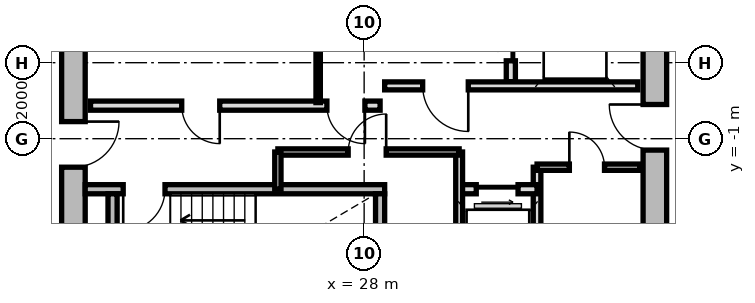
"""IFC4 building model, lengths in metres.
Left out: names, types, materials, properties, quantities, classifications, styles, units other than length and angle.
Written with IfcOpenShell. Run it as: python <this file> out.ifc"""

import sys

from ifc_helpers import new_model, si_unit, direction, frame, frame_2d, origin, place, context, subcontext, project, spatial, rectangle, extrude, source, transform, mapped, element, fill, save


model = new_model("IFC4")
c1 = context("Model", 3, precision=1e-05, world=origin(), true_north=direction((0.0, 1.0)))
c2 = subcontext(c1, "Body", "Model", "MODEL_VIEW")
j1 = project(units=[si_unit("LENGTHUNIT", "METRE"), si_unit("PLANEANGLEUNIT", "RADIAN")], contexts=[c1])
p1 = place(None, origin())
s1 = spatial("IfcSite", under=j1, at=p1, CompositionType="ELEMENT")
p2 = place(p1, origin())
s2 = spatial("IfcBuilding", under=s1, at=p2, CompositionType="ELEMENT")
p3 = place(p2, frame((0.0, 0.0, 177.0)))
s3 = spatial("IfcBuildingStorey", under=s2, at=p3, CompositionType="ELEMENT", Elevation=177.0)
m1 = source(origin(), c2, "Body", "SweptSolid", [
    extrude(rectangle(XDim=11.1, YDim=0.62, at=frame_2d((5.55, 0.0))), origin(), (0.0, 0.0, 1.0), 2.81),
])
p4 = place(p3, frame((20.35, -5.55, 0.0), z_axis=(0.0, 0.0, 1.0), x_axis=(0.0, 1.0, 0.0)))
e1 = element("IfcWall", 1, at=p4, inside=s3, PredefinedType="SHEAR", context=c2, shape_type="MappedRepresentation", body=[
    mapped(m1, transform((0.0, 0.0, 0.0), x_axis=(1.0, 0.0, 0.0), y_axis=(0.0, 1.0, 0.0), z_axis=(0.0, 0.0, 1.0), scale=1.0)),
])
p5 = place(p4, frame((3.8, 0.0, 0.0)))
e2 = element("IfcOpeningElement", 2, at=p5, cuts=e1, PredefinedType="OPENING", context=c2, shape_type="SweptSolid", body=[
    extrude(rectangle(XDim=1.2, YDim=2.15, at=frame_2d((0.6, 1.075))), frame((0.0, 0.32, 0.0), z_axis=(0.0, -1.0, 0.0), x_axis=(1.0, 0.0, 0.0)), (0.0, 0.0, 1.0), 0.64),
])
p6 = place(p3, frame((35.65, 5.55, 0.0), z_axis=(0.0, 0.0, 1.0), x_axis=(0.0, -1.0, 0.0)))
e3 = element("IfcWall", 3, at=p6, inside=s3, PredefinedType="SHEAR", context=c2, shape_type="MappedRepresentation", body=[
    mapped(m1, transform((0.0, 0.0, 0.0), x_axis=(1.0, 0.0, 0.0), y_axis=(0.0, 1.0, 0.0), z_axis=(0.0, 0.0, 1.0), scale=1.0)),
])
p7 = place(p6, frame((5.65, 0.0, 0.0)))
e4 = element("IfcOpeningElement", 4, at=p7, cuts=e3, PredefinedType="OPENING", context=c2, shape_type="SweptSolid", body=[
    extrude(rectangle(XDim=1.2, YDim=2.15, at=frame_2d((0.6, 1.075))), frame((0.0, 0.32, 0.0), z_axis=(0.0, -1.0, 0.0), x_axis=(1.0, 0.0, 0.0)), (0.0, 0.0, 1.0), 0.64),
])
m2 = source(origin(), c2, "Body", "SweptSolid", [
    extrude(rectangle(XDim=7.88, YDim=0.24, at=frame_2d((3.94, 0.0))), origin(), (0.0, 0.0, 1.0), 2.81),
])
p8 = place(p3, frame((20.66, -2.33, 0.0), z_axis=(0.0, 0.0, 1.0), x_axis=(1.0, 0.0, 0.0)))
e5 = element("IfcWall", 5, at=p8, inside=s3, PredefinedType="PARTITIONING", context=c2, shape_type="MappedRepresentation", body=[
    mapped(m2, transform((0.0, 0.0, 0.0), x_axis=(1.0, 0.0, 0.0), y_axis=(0.0, 1.0, 0.0), z_axis=(0.0, 0.0, 1.0), scale=1.0)),
])
p9 = place(p8, frame((1.0, 0.0, 0.0)))
e6 = element("IfcOpeningElement", 6, at=p9, cuts=e5, PredefinedType="OPENING", context=c2, shape_type="SweptSolid", body=[
    extrude(rectangle(XDim=1.1, YDim=2.15, at=frame_2d((0.55, 1.075))), frame((0.0, 0.13, 0.0), z_axis=(0.0, -1.0, 0.0), x_axis=(1.0, 0.0, 0.0)), (0.0, 0.0, 1.0), 0.26),
])
m3 = source(origin(), c2, "Body", "SweptSolid", [
    extrude(rectangle(XDim=3.19, YDim=0.24, at=frame_2d((1.595, 0.0))), origin(), (0.0, 0.0, 1.0), 2.81),
])
for number, where, z_axis, x_axis in (
    (7, (21.38, -5.64, 0.0), (0.0, 0.0, 1.0), (0.0, 1.0, 0.0)),
    (8, (28.42, -5.64, 0.0), (0.0, 0.0, 1.0), (0.0, 1.0, 0.0)),
):
    element("IfcWall", number, at=place(p3, frame(where, z_axis=z_axis, x_axis=x_axis)), inside=s3, PredefinedType="PARTITIONING", context=c2, shape_type="MappedRepresentation", body=[
        mapped(m3, transform((0.0, 0.0, 0.0), x_axis=(1.0, 0.0, 0.0), y_axis=(0.0, 1.0, 0.0), z_axis=(0.0, 0.0, 1.0), scale=1.0)),
    ])
m4 = source(origin(), c2, "Body", "SweptSolid", [
    extrude(rectangle(XDim=5.0, YDim=0.24, at=frame_2d((2.5, 0.0))), origin(), (0.0, 0.0, 1.0), 2.795),
])
p10 = place(p3, frame((31.86, 0.5, 0.0), z_axis=(0.0, 0.0, 1.0), x_axis=(0.0, 1.0, 0.0)))
e9 = element("IfcWall", 9, at=p10, inside=s3, PredefinedType="PARTITIONING", context=c2, shape_type="MappedRepresentation", body=[
    mapped(m4, transform((0.0, 0.0, 0.0), x_axis=(1.0, 0.0, 0.0), y_axis=(0.0, 1.0, 0.0), z_axis=(0.0, 0.0, 1.0), scale=1.0)),
])
p11 = place(p10, frame((3.05, 0.0, 0.0)))
e10 = element("IfcOpeningElement", 10, at=p11, cuts=e9, PredefinedType="OPENING", context=c2, shape_type="SweptSolid", body=[
    extrude(rectangle(XDim=1.3, YDim=2.2, at=frame_2d((0.65, 1.1))), frame((0.0, 0.13, 0.0), z_axis=(0.0, -1.0, 0.0), x_axis=(1.0, 0.0, 0.0)), (0.0, 0.0, 1.0), 0.26),
])
p12 = place(p10, frame((0.55, 0.0, 0.0)))
e11 = element("IfcOpeningElement", 11, at=p12, cuts=e9, PredefinedType="OPENING", context=c2, shape_type="SweptSolid", body=[
    extrude(rectangle(XDim=1.3, YDim=2.2, at=frame_2d((0.65, 1.1))), frame((0.0, 0.13, 0.0), z_axis=(0.0, -1.0, 0.0), x_axis=(1.0, 0.0, 0.0)), (0.0, 0.0, 1.0), 0.26),
])
m5 = source(origin(), c2, "Body", "SweptSolid", [
    extrude(rectangle(XDim=6.66, YDim=0.21, at=frame_2d((3.33, 0.0))), origin(), (0.0, 0.0, 1.0), 2.795),
])
p13 = place(p3, frame((28.54, 0.39, 0.0), z_axis=(0.0, 0.0, 1.0), x_axis=(1.0, 0.0, 0.0)))
e12 = element("IfcWall", 12, at=p13, inside=s3, PredefinedType="PARTITIONING", context=c2, shape_type="MappedRepresentation", body=[
    mapped(m5, transform((0.0, 0.0, 0.0), x_axis=(1.0, 0.0, 0.0), y_axis=(0.0, 1.0, 0.0), z_axis=(0.0, 0.0, 1.0), scale=1.0)),
])
p14 = place(p13, frame((1.0, 0.0, 0.0)))
e13 = element("IfcOpeningElement", 13, at=p14, cuts=e12, PredefinedType="OPENING", context=c2, shape_type="SweptSolid", body=[
    extrude(rectangle(XDim=1.2, YDim=2.15, at=frame_2d((0.6, 1.075))), frame((0.0, 0.115, 0.0), z_axis=(0.0, -1.0, 0.0), x_axis=(1.0, 0.0, 0.0)), (0.0, 0.0, 1.0), 0.23),
])
m6 = source(origin(), c2, "Body", "SweptSolid", [
    extrude(rectangle(XDim=7.62, YDim=0.24, at=frame_2d((3.81, 0.0))), origin(), (0.0, 0.0, 1.0), 2.795),
])
p15 = place(p3, frame((20.8, -0.13, 0.0), z_axis=(0.0, 0.0, 1.0), x_axis=(1.0, 0.0, 0.0)))
e14 = element("IfcWall", 14, at=p15, inside=s3, PredefinedType="PARTITIONING", context=c2, shape_type="MappedRepresentation", body=[
    mapped(m6, transform((0.0, 0.0, 0.0), x_axis=(1.0, 0.0, 0.0), y_axis=(0.0, 1.0, 0.0), z_axis=(0.0, 0.0, 1.0), scale=1.0)),
])
p16 = place(p15, frame((6.22, 0.0, 0.0)))
e15 = element("IfcOpeningElement", 15, at=p16, cuts=e14, PredefinedType="OPENING", context=c2, shape_type="SweptSolid", body=[
    extrude(rectangle(XDim=1.0, YDim=2.1, at=frame_2d((0.5, 1.05))), frame((0.0, 0.13, 0.0), z_axis=(0.0, -1.0, 0.0), x_axis=(1.0, 0.0, 0.0)), (0.0, 0.0, 1.0), 0.26),
])
p17 = place(p15, frame((2.4, 0.0, 0.0)))
e16 = element("IfcOpeningElement", 16, at=p17, cuts=e14, PredefinedType="OPENING", context=c2, shape_type="SweptSolid", body=[
    extrude(rectangle(XDim=1.0, YDim=2.1, at=frame_2d((0.5, 1.05))), frame((0.0, 0.13, 0.0), z_axis=(0.0, -1.0, 0.0), x_axis=(1.0, 0.0, 0.0)), (0.0, 0.0, 1.0), 0.26),
])
m7 = source(origin(), c2, "Body", "SweptSolid", [
    extrude(rectangle(XDim=2.33, YDim=0.115, at=frame_2d((1.165, 0.0))), origin(), (0.0, 0.0, 1.0), 2.795),
])
p18 = place(p3, frame((26.79, -0.05, 0.0), z_axis=(0.0, 0.0, 1.0), x_axis=(0.0, 1.0, 0.0)))
e17 = element("IfcWall", 17, at=p18, inside=s3, PredefinedType="PARTITIONING", context=c2, shape_type="MappedRepresentation", body=[
    mapped(m7, transform((0.0, 0.0, 0.0), x_axis=(1.0, 0.0, 0.0), y_axis=(0.0, 1.0, 0.0), z_axis=(0.0, 0.0, 1.0), scale=1.0)),
])
m8 = source(origin(), c2, "Body", "SweptSolid", [
    extrude(rectangle(XDim=3.8, YDim=0.2, at=frame_2d((1.9, 0.0))), origin(), (0.0, 0.0, 1.0), 2.795),
])
p19 = place(p3, frame((32.55, -5.55, 0.0), z_axis=(0.0, 0.0, 1.0), x_axis=(0.0, 1.0, 0.0)))
e18 = element("IfcWall", 18, at=p19, inside=s3, PredefinedType="PARTITIONING", context=c2, shape_type="MappedRepresentation", body=[
    mapped(m8, transform((0.0, 0.0, 0.0), x_axis=(1.0, 0.0, 0.0), y_axis=(0.0, 1.0, 0.0), z_axis=(0.0, 0.0, 1.0), scale=1.0)),
])
m9 = source(origin(), c2, "Body", "SweptSolid", [
    extrude(rectangle(XDim=2.05, YDim=0.24, at=frame_2d((1.025, 0.0))), origin(), (0.0, 0.0, 1.0), 2.795),
])
p20 = place(p3, frame((30.5, -2.33, 0.0), z_axis=(0.0, 0.0, 1.0), x_axis=(1.0, 0.0, 0.0)))
e19 = element("IfcWall", 19, at=p20, inside=s3, PredefinedType="PARTITIONING", context=c2, shape_type="MappedRepresentation", body=[
    mapped(m9, transform((0.0, 0.0, 0.0), x_axis=(1.0, 0.0, 0.0), y_axis=(0.0, 1.0, 0.0), z_axis=(0.0, 0.0, 1.0), scale=1.0)),
])
p21 = place(p20, frame((0.45, 0.0, 0.0)))
e20 = element("IfcOpeningElement", 20, at=p21, cuts=e19, PredefinedType="OPENING", context=c2, shape_type="SweptSolid", body=[
    extrude(rectangle(XDim=1.1, YDim=2.2, at=frame_2d((0.55, 1.1))), frame((0.0, 0.13, 0.0), z_axis=(0.0, -1.0, 0.0), x_axis=(1.0, 0.0, 0.0)), (0.0, 0.0, 1.0), 0.26),
])
m10 = source(origin(), c2, "Body", "SweptSolid", [
    extrude(rectangle(XDim=4.2, YDim=0.18, at=frame_2d((2.1, 0.0))), origin(), (0.0, 0.0, 1.0), 2.795),
])
p22 = place(p3, frame((30.5, -5.55, 0.0), z_axis=(0.0, 0.0, 1.0), x_axis=(0.0, 1.0, 0.0)))
e21 = element("IfcWall", 21, at=p22, inside=s3, PredefinedType="PARTITIONING", context=c2, shape_type="MappedRepresentation", body=[
    mapped(m10, transform((0.0, 0.0, 0.0), x_axis=(1.0, 0.0, 0.0), y_axis=(0.0, 1.0, 0.0), z_axis=(0.0, 0.0, 1.0), scale=1.0)),
])
m11 = source(origin(), c2, "Body", "SweptSolid", [
    extrude(rectangle(XDim=4.77, YDim=0.165, at=frame_2d((2.385, 0.0))), origin(), (0.0, 0.0, 1.0), 2.795),
])
p23 = place(p3, frame((25.73, -1.35, 0.0), z_axis=(0.0, 0.0, 1.0), x_axis=(1.0, 0.0, 0.0)))
e22 = element("IfcWall", 22, at=p23, inside=s3, PredefinedType="PARTITIONING", context=c2, shape_type="MappedRepresentation", body=[
    mapped(m11, transform((0.0, 0.0, 0.0), x_axis=(1.0, 0.0, 0.0), y_axis=(0.0, 1.0, 0.0), z_axis=(0.0, 0.0, 1.0), scale=1.0)),
])
p24 = place(p23, frame((1.85, 0.0, 0.0)))
e23 = element("IfcOpeningElement", 23, at=p24, cuts=e22, PredefinedType="OPENING", context=c2, shape_type="SweptSolid", body=[
    extrude(rectangle(XDim=1.0, YDim=2.1, at=frame_2d((0.5, 1.05))), frame((0.0, 0.093, 0.0), z_axis=(0.0, -1.0, 0.0), x_axis=(1.0, 0.0, 0.0)), (0.0, 0.0, 1.0), 0.185),
])
m12 = source(origin(), c2, "Body", "SweptSolid", [
    extrude(rectangle(XDim=0.98, YDim=0.165, at=frame_2d((0.49, 0.0))), origin(), (0.0, 0.0, 1.0), 2.795),
])
p25 = place(p3, frame((25.73, -2.33, 0.0), z_axis=(0.0, 0.0, 1.0), x_axis=(0.0, 1.0, 0.0)))
e24 = element("IfcWall", 24, at=p25, inside=s3, PredefinedType="PARTITIONING", context=c2, shape_type="MappedRepresentation", body=[
    mapped(m12, transform((0.0, 0.0, 0.0), x_axis=(1.0, 0.0, 0.0), y_axis=(0.0, 1.0, 0.0), z_axis=(0.0, 0.0, 1.0), scale=1.0)),
])
m13 = source(origin(), c2, "Body", "SweptSolid", [
    extrude(rectangle(XDim=2.7, YDim=0.165, at=frame_2d((1.35, 0.0))), origin(), (0.0, 0.0, 1.0), 2.795),
])
p26 = place(p3, frame((32.55, -1.75, 0.0), z_axis=(0.0, 0.0, 1.0), x_axis=(1.0, 0.0, 0.0)))
e25 = element("IfcWall", 25, at=p26, inside=s3, PredefinedType="PARTITIONING", context=c2, shape_type="MappedRepresentation", body=[
    mapped(m13, transform((0.0, 0.0, 0.0), x_axis=(1.0, 0.0, 0.0), y_axis=(0.0, 1.0, 0.0), z_axis=(0.0, 0.0, 1.0), scale=1.0)),
])
p27 = place(p26, frame((0.85, 0.0, 0.0)))
e26 = element("IfcOpeningElement", 26, at=p27, cuts=e25, PredefinedType="OPENING", context=c2, shape_type="SweptSolid", body=[
    extrude(rectangle(XDim=0.925, YDim=2.1, at=frame_2d((0.462, 1.05))), frame((0.0, 0.093, 0.0), z_axis=(0.0, -1.0, 0.0), x_axis=(1.0, 0.0, 0.0)), (0.0, 0.0, 1.0), 0.185),
])
m14 = source(origin(), c2, "Body", "SweptSolid", [
    extrude(rectangle(XDim=1.1, YDim=2.15, at=frame_2d((0.55, 1.075))), frame((0.0, 0.025, 0.0), z_axis=(0.0, -1.0, 0.0), x_axis=(1.0, 0.0, 0.0)), (0.0, 0.0, 1.0), 0.05),
])
p28 = place(p9, frame((1.1, 0.0, 0.0), z_axis=(0.0, 0.0, 1.0), x_axis=(-1.0, 0.0, 0.0)))
e27 = element("IfcDoor", 27, at=p28, inside=s3, OperationType="SINGLE_SWING_RIGHT", PredefinedType="DOOR", context=c2, shape_type="MappedRepresentation", body=[
    mapped(m14, transform((0.0, 0.0, 0.0), x_axis=(1.0, 0.0, 0.0), y_axis=(0.0, 1.0, 0.0), z_axis=(0.0, 0.0, 1.0), scale=1.0)),
])
fill(e6, e27)
m15 = source(origin(), c2, "Body", "SweptSolid", [
    extrude(rectangle(XDim=1.3, YDim=2.2, at=frame_2d((0.65, 1.1))), frame((0.0, 0.025, 0.0), z_axis=(0.0, -1.0, 0.0), x_axis=(1.0, 0.0, 0.0)), (0.0, 0.0, 1.0), 0.05),
])
p29 = place(p12, origin())
e28 = element("IfcDoor", 28, at=p29, inside=s3, OperationType="SLIDING_TO_RIGHT", PredefinedType="DOOR", context=c2, shape_type="MappedRepresentation", body=[
    mapped(m15, transform((0.0, 0.0, 0.0), x_axis=(1.0, 0.0, 0.0), y_axis=(0.0, 1.0, 0.0), z_axis=(0.0, 0.0, 1.0), scale=1.0)),
])
fill(e11, e28)
m16 = source(origin(), c2, "Body", "SweptSolid", [
    extrude(rectangle(XDim=1.2, YDim=2.15, at=frame_2d((0.6, 1.075))), frame((0.0, 0.025, 0.0), z_axis=(0.0, -1.0, 0.0), x_axis=(1.0, 0.0, 0.0)), (0.0, 0.0, 1.0), 0.05),
])
p30 = place(p14, frame((1.2, 0.0, 0.0), z_axis=(0.0, 0.0, 1.0), x_axis=(-1.0, 0.0, 0.0)))
e29 = element("IfcDoor", 29, at=p30, inside=s3, OperationType="SINGLE_SWING_LEFT", PredefinedType="DOOR", context=c2, shape_type="MappedRepresentation", body=[
    mapped(m16, transform((0.0, 0.0, 0.0), x_axis=(1.0, 0.0, 0.0), y_axis=(0.0, 1.0, 0.0), z_axis=(0.0, 0.0, 1.0), scale=1.0)),
])
fill(e13, e29)
p31 = place(p5, frame((1.2, 0.0, 0.0), z_axis=(0.0, 0.0, 1.0), x_axis=(-1.0, 0.0, 0.0)))
e30 = element("IfcDoor", 30, at=p31, inside=s3, OperationType="SINGLE_SWING_LEFT", PredefinedType="DOOR", context=c2, shape_type="MappedRepresentation", body=[
    mapped(m16, transform((0.0, 0.0, 0.0), x_axis=(1.0, 0.0, 0.0), y_axis=(0.0, 1.0, 0.0), z_axis=(0.0, 0.0, 1.0), scale=1.0)),
])
fill(e2, e30)
p32 = place(p7, frame((1.2, 0.0, 0.0), z_axis=(0.0, 0.0, 1.0), x_axis=(-1.0, 0.0, 0.0)))
e31 = element("IfcDoor", 31, at=p32, inside=s3, OperationType="SINGLE_SWING_RIGHT", PredefinedType="DOOR", context=c2, shape_type="MappedRepresentation", body=[
    mapped(m16, transform((0.0, 0.0, 0.0), x_axis=(1.0, 0.0, 0.0), y_axis=(0.0, 1.0, 0.0), z_axis=(0.0, 0.0, 1.0), scale=1.0)),
])
fill(e4, e31)
m17 = source(origin(), c2, "Body", "SweptSolid", [
    extrude(rectangle(XDim=1.0, YDim=2.1, at=frame_2d((0.5, 1.05))), frame((0.0, 0.025, 0.0), z_axis=(0.0, -1.0, 0.0), x_axis=(1.0, 0.0, 0.0)), (0.0, 0.0, 1.0), 0.05),
])
p33 = place(p16, frame((1.0, 0.0, 0.0), z_axis=(0.0, 0.0, 1.0), x_axis=(-1.0, 0.0, 0.0)))
e32 = element("IfcDoor", 32, at=p33, inside=s3, OperationType="SINGLE_SWING_LEFT", PredefinedType="DOOR", context=c2, shape_type="MappedRepresentation", body=[
    mapped(m17, transform((0.0, 0.0, 0.0), x_axis=(1.0, 0.0, 0.0), y_axis=(0.0, 1.0, 0.0), z_axis=(0.0, 0.0, 1.0), scale=1.0)),
])
fill(e15, e32)
p34 = place(p17, frame((1.0, 0.0, 0.0), z_axis=(0.0, 0.0, 1.0), x_axis=(-1.0, 0.0, 0.0)))
e33 = element("IfcDoor", 33, at=p34, inside=s3, OperationType="SINGLE_SWING_LEFT", PredefinedType="DOOR", context=c2, shape_type="MappedRepresentation", body=[
    mapped(m17, transform((0.0, 0.0, 0.0), x_axis=(1.0, 0.0, 0.0), y_axis=(0.0, 1.0, 0.0), z_axis=(0.0, 0.0, 1.0), scale=1.0)),
])
fill(e16, e33)
m18 = source(origin(), c2, "Body", "SweptSolid", [
    extrude(rectangle(XDim=1.1, YDim=2.2, at=frame_2d((0.55, 1.1))), frame((0.0, 0.025, 0.0), z_axis=(0.0, -1.0, 0.0), x_axis=(1.0, 0.0, 0.0)), (0.0, 0.0, 1.0), 0.05),
])
p35 = place(p21, frame((1.1, 0.0, 0.0), z_axis=(0.0, 0.0, 1.0), x_axis=(-1.0, 0.0, 0.0)))
e34 = element("IfcDoor", 34, at=p35, inside=s3, OperationType="SLIDING_TO_RIGHT", PredefinedType="DOOR", context=c2, shape_type="MappedRepresentation", body=[
    mapped(m18, transform((0.0, 0.0, 0.0), x_axis=(1.0, 0.0, 0.0), y_axis=(0.0, 1.0, 0.0), z_axis=(0.0, 0.0, 1.0), scale=1.0)),
])
fill(e20, e34)
p36 = place(p24, origin())
e35 = element("IfcDoor", 35, at=p36, inside=s3, OperationType="SINGLE_SWING_RIGHT", PredefinedType="DOOR", context=c2, shape_type="MappedRepresentation", body=[
    mapped(m17, transform((0.0, 0.0, 0.0), x_axis=(1.0, 0.0, 0.0), y_axis=(0.0, 1.0, 0.0), z_axis=(0.0, 0.0, 1.0), scale=1.0)),
])
fill(e23, e35)
m19 = source(origin(), c2, "Body", "SweptSolid", [
    extrude(rectangle(XDim=0.925, YDim=2.1, at=frame_2d((0.462, 1.05))), frame((0.0, 0.025, 0.0), z_axis=(0.0, -1.0, 0.0), x_axis=(1.0, 0.0, 0.0)), (0.0, 0.0, 1.0), 0.05),
])
p37 = place(p27, origin())
e36 = element("IfcDoor", 36, at=p37, inside=s3, OperationType="SINGLE_SWING_LEFT", PredefinedType="DOOR", context=c2, shape_type="MappedRepresentation", body=[
    mapped(m19, transform((0.0, 0.0, 0.0), x_axis=(1.0, 0.0, 0.0), y_axis=(0.0, 1.0, 0.0), z_axis=(0.0, 0.0, 1.0), scale=1.0)),
])
fill(e26, e36)
save(model, sys.argv[1])
